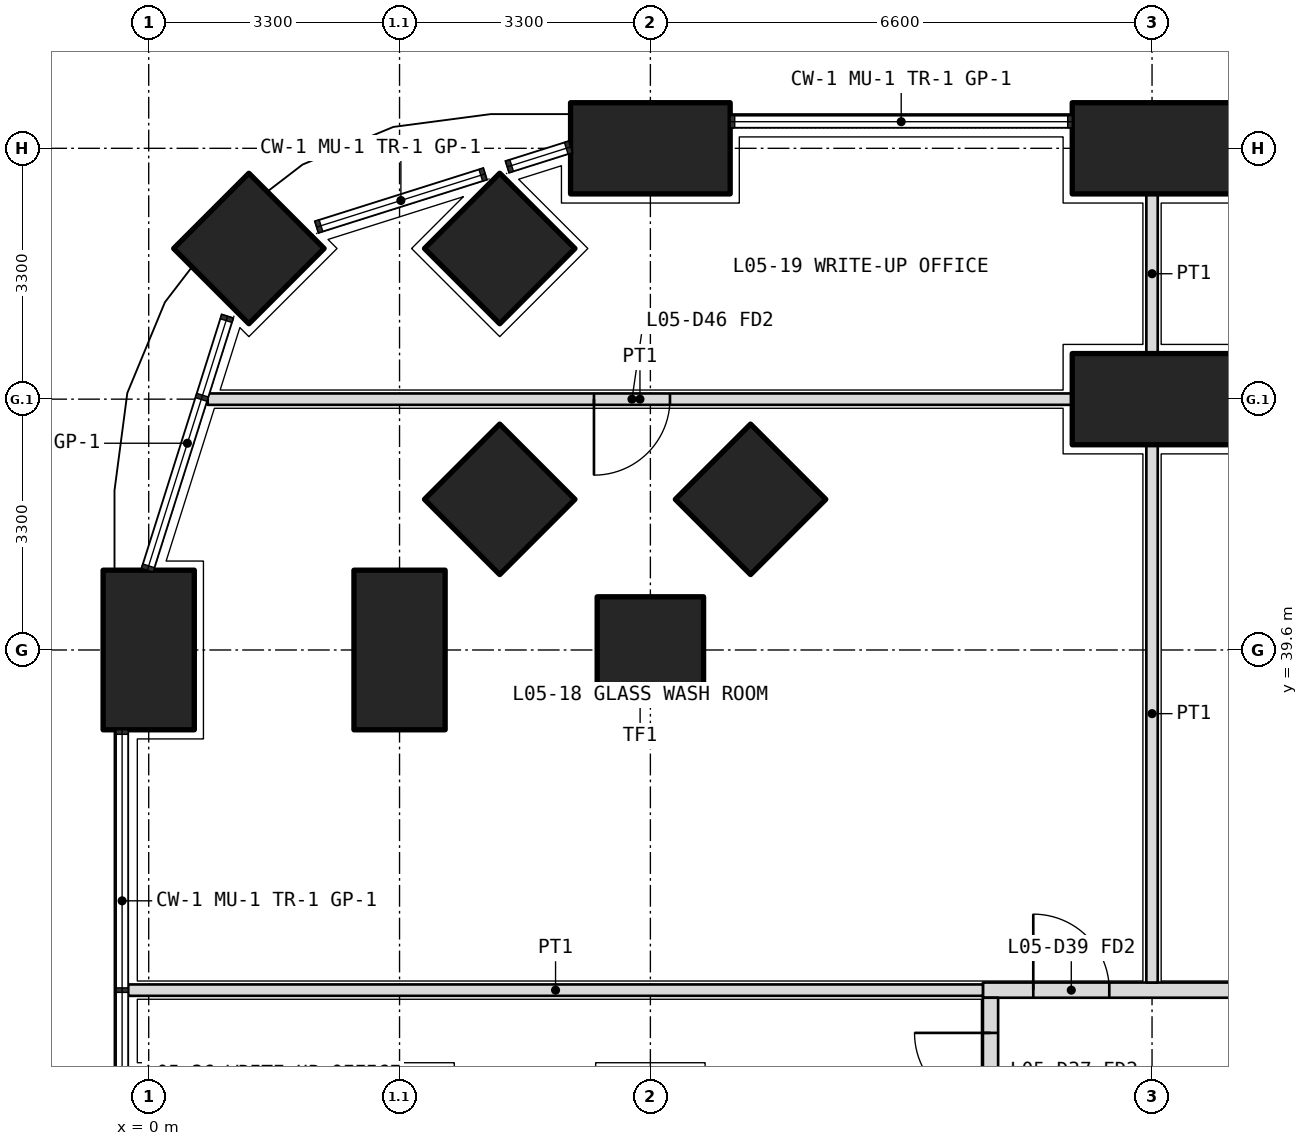
"""IFC4 building model, lengths in metres.
Left out: names, types, materials, properties, quantities, classifications, styles, units other than length and angle.
Written with IfcOpenShell. Run it as: python <this file> out.ifc"""

import sys

from ifc_helpers import new_model, si_unit, direction, frame, frame_2d, origin, origin_2d, place, context, subcontext, project, spatial, rectangle, extrude, element, fill, save


model = new_model("IFC4")
c1 = context("Model", 3, precision=1e-05, world=origin(), true_north=direction((0.0, 1.0)))
c2 = subcontext(c1, "Body", "Model", "MODEL_VIEW")
j1 = project(units=[si_unit("LENGTHUNIT", "METRE"), si_unit("PLANEANGLEUNIT", "RADIAN")], contexts=[c1])
p1 = place(None, origin())
s1 = spatial("IfcSite", under=j1, at=p1, CompositionType="ELEMENT")
p2 = place(p1, origin())
s2 = spatial("IfcBuilding", under=s1, at=p2, CompositionType="ELEMENT")
p3 = place(p2, frame((0.0, 0.0, 25.5)))
s3 = spatial("IfcBuildingStorey", under=s2, at=p3, CompositionType="ELEMENT", Elevation=25.5)
p4 = place(p3, frame((1.318, 44.882, 0.0), z_axis=(0.0, 0.0, 1.0), x_axis=(0.707106781187, 0.707106781187, 0.0)))
e1 = element("IfcColumn", 1, at=p4, inside=s3, PredefinedType="COLUMN", context=c2, shape_type="SweptSolid", body=[
    extrude(rectangle(XDim=1.4, YDim=1.4, at=origin_2d()), origin(), (0.0, 0.0, 1.0), 4.2),
])
for number, where, z_axis, x_axis in (
    (2, (0.0, 39.6, 0.0), (0.0, 0.0, 1.0), (0.0, 1.0, 0.0)),
    (3, (6.6, 46.2, 0.0), (0.0, 0.0, 1.0), (1.0, 0.0, 0.0)),
    (4, (13.2, 46.2, 0.0), (0.0, 0.0, 1.0), (1.0, 0.0, 0.0)),
):
    element("IfcColumn", number, at=place(p3, frame(where, z_axis=z_axis, x_axis=x_axis)), inside=s3, PredefinedType="COLUMN", context=c2, shape_type="SweptSolid", body=[
        extrude(rectangle(XDim=2.1, YDim=1.2, at=origin_2d()), origin(), (0.0, 0.0, 1.0), 4.2),
    ])
for number, where, z_axis, x_axis in (
    (5, (6.6, 39.6, 0.0), (0.0, 0.0, 1.0), (1.0, 0.0, 0.0)),
    (6, (4.618, 44.882, 0.0), (0.0, 0.0, 1.0), (0.707, 0.707, 0.0)),
):
    element("IfcColumn", number, at=place(p3, frame(where, z_axis=z_axis, x_axis=x_axis)), inside=s3, PredefinedType="COLUMN", context=c2, shape_type="SweptSolid", body=[
        extrude(rectangle(XDim=1.4, YDim=1.4, at=origin_2d()), origin(), (0.0, 0.0, 1.0), 4.2),
    ])
p5 = place(p3, frame((3.3, 39.6, 0.0), z_axis=(0.0, 0.0, 1.0), x_axis=(0.0, 1.0, 0.0)))
e7 = element("IfcColumn", 7, at=p5, inside=s3, PredefinedType="COLUMN", context=c2, shape_type="SweptSolid", body=[
    extrude(rectangle(XDim=2.1, YDim=1.2, at=origin_2d()), origin(), (0.0, 0.0, 1.0), 4.2),
])
p6 = place(p3, frame((4.618, 41.582, 0.0), z_axis=(0.0, 0.0, 1.0), x_axis=(0.707106781187, 0.707106781187, 0.0)))
e8 = element("IfcColumn", 8, at=p6, inside=s3, PredefinedType="COLUMN", context=c2, shape_type="SweptSolid", body=[
    extrude(rectangle(XDim=1.4, YDim=1.4, at=origin_2d()), origin(), (0.0, 0.0, 1.0), 4.2),
])
p7 = place(p3, frame((13.2, 42.9, 0.0), z_axis=(0.0, 0.0, 1.0), x_axis=(1.0, 0.0, 0.0)))
e9 = element("IfcColumn", 9, at=p7, inside=s3, PredefinedType="COLUMN", context=c2, shape_type="SweptSolid", body=[
    extrude(rectangle(XDim=2.1, YDim=1.2, at=origin_2d()), origin(), (0.0, 0.0, 1.0), 4.2),
])
p8 = place(p3, frame((7.918, 41.582, 0.0), z_axis=(0.0, 0.0, 1.0), x_axis=(0.707106781187, 0.707106781187, 0.0)))
e10 = element("IfcColumn", 10, at=p8, inside=s3, PredefinedType="COLUMN", context=c2, shape_type="SweptSolid", body=[
    extrude(rectangle(XDim=1.4, YDim=1.4, at=origin_2d()), origin(), (0.0, 0.0, 1.0), 4.2),
])
p9 = place(p3, frame((10.975, 35.125, 0.0), z_axis=(0.0, 0.0, 1.0), x_axis=(1.0, 0.0, 0.0)))
e11 = element("IfcWall", 11, at=p9, inside=s3, PredefinedType="PARTITIONING", context=c2, shape_type="SweptSolid", body=[
    extrude(rectangle(XDim=30.85, YDim=0.2, at=frame_2d((15.425, 0.0))), origin(), (0.0, 0.0, 1.0), 2.85),
])
p10 = place(p9, frame((0.663, 0.0, 0.0)))
e12 = element("IfcOpeningElement", 12, at=p10, cuts=e11, PredefinedType="OPENING", context=c2, shape_type="SweptSolid", body=[
    extrude(rectangle(XDim=1.0, YDim=2.1, at=frame_2d((0.5, 1.05))), frame((0.0, 0.11, 0.0), z_axis=(0.0, -1.0, 0.0), x_axis=(1.0, 0.0, 0.0)), (0.0, 0.0, 1.0), 0.22),
])
p11 = place(p9, frame((4.925, 0.0, 0.0)))
e13 = element("IfcOpeningElement", 13, at=p11, cuts=e11, PredefinedType="OPENING", context=c2, shape_type="SweptSolid", body=[
    extrude(rectangle(XDim=1.2, YDim=2.1, at=frame_2d((0.6, 1.05))), frame((0.0, 0.11, 0.0), z_axis=(0.0, -1.0, 0.0), x_axis=(1.0, 0.0, 0.0)), (0.0, 0.0, 1.0), 0.22),
])
p12 = place(p9, frame((9.975, 0.0, 0.0)))
e14 = element("IfcOpeningElement", 14, at=p12, cuts=e11, PredefinedType="OPENING", context=c2, shape_type="SweptSolid", body=[
    extrude(rectangle(XDim=1.0, YDim=2.1, at=frame_2d((0.5, 1.05))), frame((0.0, 0.11, 0.0), z_axis=(0.0, -1.0, 0.0), x_axis=(1.0, 0.0, 0.0)), (0.0, 0.0, 1.0), 0.22),
])
p13 = place(p9, frame((13.725, 0.0, 0.0)))
e15 = element("IfcOpeningElement", 15, at=p13, cuts=e11, PredefinedType="OPENING", context=c2, shape_type="SweptSolid", body=[
    extrude(rectangle(XDim=1.0, YDim=2.1, at=frame_2d((0.5, 1.05))), frame((0.0, 0.11, 0.0), z_axis=(0.0, -1.0, 0.0), x_axis=(1.0, 0.0, 0.0)), (0.0, 0.0, 1.0), 0.22),
])
p14 = place(p9, frame((17.025, 0.0, 0.0)))
e16 = element("IfcOpeningElement", 16, at=p14, cuts=e11, PredefinedType="OPENING", context=c2, shape_type="SweptSolid", body=[
    extrude(rectangle(XDim=1.0, YDim=2.1, at=frame_2d((0.5, 1.05))), frame((0.0, 0.11, 0.0), z_axis=(0.0, -1.0, 0.0), x_axis=(1.0, 0.0, 0.0)), (0.0, 0.0, 1.0), 0.22),
])
p15 = place(p9, frame((24.137, 0.0, 0.0)))
e17 = element("IfcOpeningElement", 17, at=p15, cuts=e11, PredefinedType="OPENING", context=c2, shape_type="SweptSolid", body=[
    extrude(rectangle(XDim=1.2, YDim=2.1, at=frame_2d((0.6, 1.05))), frame((0.0, 0.11, 0.0), z_axis=(0.0, -1.0, 0.0), x_axis=(1.0, 0.0, 0.0)), (0.0, 0.0, 1.0), 0.22),
])
p16 = place(p3, frame((11.075, 11.175, 0.0), z_axis=(0.0, 0.0, 1.0), x_axis=(0.0, 1.0, 0.0)))
e18 = element("IfcWall", 18, at=p16, inside=s3, PredefinedType="PARTITIONING", context=c2, shape_type="SweptSolid", body=[
    extrude(rectangle(XDim=23.85, YDim=0.2, at=frame_2d((11.925, 0.0))), origin(), (0.0, 0.0, 1.0), 2.85),
])
p17 = place(p16, frame((0.363, 0.0, 0.0)))
e19 = element("IfcOpeningElement", 19, at=p17, cuts=e18, PredefinedType="OPENING", context=c2, shape_type="SweptSolid", body=[
    extrude(rectangle(XDim=1.2, YDim=2.1, at=frame_2d((0.6, 1.05))), frame((0.0, 0.11, 0.0), z_axis=(0.0, -1.0, 0.0), x_axis=(1.0, 0.0, 0.0)), (0.0, 0.0, 1.0), 0.22),
])
p18 = place(p16, frame((2.575, 0.0, 0.0)))
e20 = element("IfcOpeningElement", 20, at=p18, cuts=e18, PredefinedType="OPENING", context=c2, shape_type="SweptSolid", body=[
    extrude(rectangle(XDim=1.0, YDim=2.1, at=frame_2d((0.5, 1.05))), frame((0.0, 0.11, 0.0), z_axis=(0.0, -1.0, 0.0), x_axis=(1.0, 0.0, 0.0)), (0.0, 0.0, 1.0), 0.22),
])
p19 = place(p16, frame((5.65, 0.0, 0.0)))
e21 = element("IfcOpeningElement", 21, at=p19, cuts=e18, PredefinedType="OPENING", context=c2, shape_type="SweptSolid", body=[
    extrude(rectangle(XDim=0.9, YDim=2.1, at=frame_2d((0.45, 1.05))), frame((0.0, 0.11, 0.0), z_axis=(0.0, -1.0, 0.0), x_axis=(1.0, 0.0, 0.0)), (0.0, 0.0, 1.0), 0.22),
])
p20 = place(p16, frame((9.5, 0.0, 0.0)))
e22 = element("IfcOpeningElement", 22, at=p20, cuts=e18, PredefinedType="OPENING", context=c2, shape_type="SweptSolid", body=[
    extrude(rectangle(XDim=0.9, YDim=2.1, at=frame_2d((0.45, 1.05))), frame((0.0, 0.11, 0.0), z_axis=(0.0, -1.0, 0.0), x_axis=(1.0, 0.0, 0.0)), (0.0, 0.0, 1.0), 0.22),
])
p21 = place(p16, frame((13.025, 0.0, 0.0)))
e23 = element("IfcOpeningElement", 23, at=p21, cuts=e18, PredefinedType="OPENING", context=c2, shape_type="SweptSolid", body=[
    extrude(rectangle(XDim=1.0, YDim=2.1, at=frame_2d((0.5, 1.05))), frame((0.0, 0.11, 0.0), z_axis=(0.0, -1.0, 0.0), x_axis=(1.0, 0.0, 0.0)), (0.0, 0.0, 1.0), 0.22),
])
p22 = place(p16, frame((17.925, 0.0, 0.0)))
e24 = element("IfcOpeningElement", 24, at=p22, cuts=e18, PredefinedType="OPENING", context=c2, shape_type="SweptSolid", body=[
    extrude(rectangle(XDim=1.2, YDim=2.1, at=frame_2d((0.6, 1.05))), frame((0.0, 0.11, 0.0), z_axis=(0.0, -1.0, 0.0), x_axis=(1.0, 0.0, 0.0)), (0.0, 0.0, 1.0), 0.22),
])
p23 = place(p16, frame((22.387, 0.0, 0.0)))
e25 = element("IfcOpeningElement", 25, at=p23, cuts=e18, PredefinedType="OPENING", context=c2, shape_type="SweptSolid", body=[
    extrude(rectangle(XDim=1.0, YDim=2.1, at=frame_2d((0.5, 1.05))), frame((0.0, 0.11, 0.0), z_axis=(0.0, -1.0, 0.0), x_axis=(1.0, 0.0, 0.0)), (0.0, 0.0, 1.0), 0.22),
])
p24 = place(p3, frame((-0.27, 35.125, 0.0), z_axis=(0.0, 0.0, 1.0), x_axis=(1.0, 0.0, 0.0)))
e26 = element("IfcWall", 26, at=p24, inside=s3, PredefinedType="PARTITIONING", context=c2, shape_type="SweptSolid", body=[
    extrude(rectangle(XDim=11.245, YDim=0.15, at=frame_2d((5.623, 0.0))), origin(), (0.0, 0.0, 1.0), 2.7),
])
p25 = place(p3, frame((12.15, 42.9, 0.0), z_axis=(0.0, 0.0, 1.0), x_axis=(-1.0, 0.0, 0.0)))
e27 = element("IfcWall", 27, at=p25, inside=s3, PredefinedType="PARTITIONING", context=c2, shape_type="SweptSolid", body=[
    extrude(rectangle(XDim=11.374, YDim=0.15, at=frame_2d((5.687, 0.0))), origin(), (0.0, 0.0, 1.0), 2.7),
])
p26 = place(p25, frame((5.292, 0.0, 0.0)))
e28 = element("IfcOpeningElement", 28, at=p26, cuts=e27, PredefinedType="OPENING", context=c2, shape_type="SweptSolid", body=[
    extrude(rectangle(XDim=1.0, YDim=2.1, at=frame_2d((0.5, 1.05))), frame((0.0, 0.085, 0.0), z_axis=(0.0, -1.0, 0.0), x_axis=(1.0, 0.0, 0.0)), (0.0, 0.0, 1.0), 0.17),
])
p27 = place(p3, frame((13.2, 45.6, 0.0), z_axis=(0.0, 0.0, 1.0), x_axis=(0.0, -1.0, 0.0)))
e29 = element("IfcWall", 29, at=p27, inside=s3, PredefinedType="PARTITIONING", context=c2, shape_type="SweptSolid", body=[
    extrude(rectangle(XDim=2.1, YDim=0.15, at=frame_2d((1.05, 0.0))), origin(), (0.0, 0.0, 1.0), 2.85),
])
p28 = place(p3, frame((13.2, 42.3, 0.0), z_axis=(0.0, 0.0, 1.0), x_axis=(0.0, -1.0, 0.0)))
e30 = element("IfcWall", 30, at=p28, inside=s3, PredefinedType="PARTITIONING", context=c2, shape_type="SweptSolid", body=[
    extrude(rectangle(XDim=7.075, YDim=0.15, at=frame_2d((3.538, 0.0))), origin(), (0.0, 0.0, 1.0), 2.85),
])
p29 = place(p10, origin())
e31 = element("IfcDoor", 31, at=p29, inside=s3, OperationType="SINGLE_SWING_LEFT", PredefinedType="DOOR", context=c2, shape_type="SweptSolid", body=[
    extrude(rectangle(XDim=1.0, YDim=2.1, at=frame_2d((0.5, 1.05))), frame((0.0, 0.025, 0.0), z_axis=(0.0, -1.0, 0.0), x_axis=(1.0, 0.0, 0.0)), (0.0, 0.0, 1.0), 0.05),
])
fill(e12, e31)
p30 = place(p26, origin())
e32 = element("IfcDoor", 32, at=p30, inside=s3, OperationType="SINGLE_SWING_RIGHT", PredefinedType="DOOR", context=c2, shape_type="SweptSolid", body=[
    extrude(rectangle(XDim=1.0, YDim=2.1, at=frame_2d((0.5, 1.05))), frame((0.0, 0.025, 0.0), z_axis=(0.0, -1.0, 0.0), x_axis=(1.0, 0.0, 0.0)), (0.0, 0.0, 1.0), 0.05),
])
fill(e28, e32)
p31 = place(p23, origin())
e33 = element("IfcDoor", 33, at=p31, inside=s3, OperationType="SINGLE_SWING_RIGHT", PredefinedType="DOOR", context=c2, shape_type="SweptSolid", body=[
    extrude(rectangle(XDim=1.0, YDim=2.1, at=frame_2d((0.5, 1.05))), frame((0.0, 0.025, 0.0), z_axis=(0.0, -1.0, 0.0), x_axis=(1.0, 0.0, 0.0)), (0.0, 0.0, 1.0), 0.05),
])
fill(e25, e33)
save(model, sys.argv[1])
